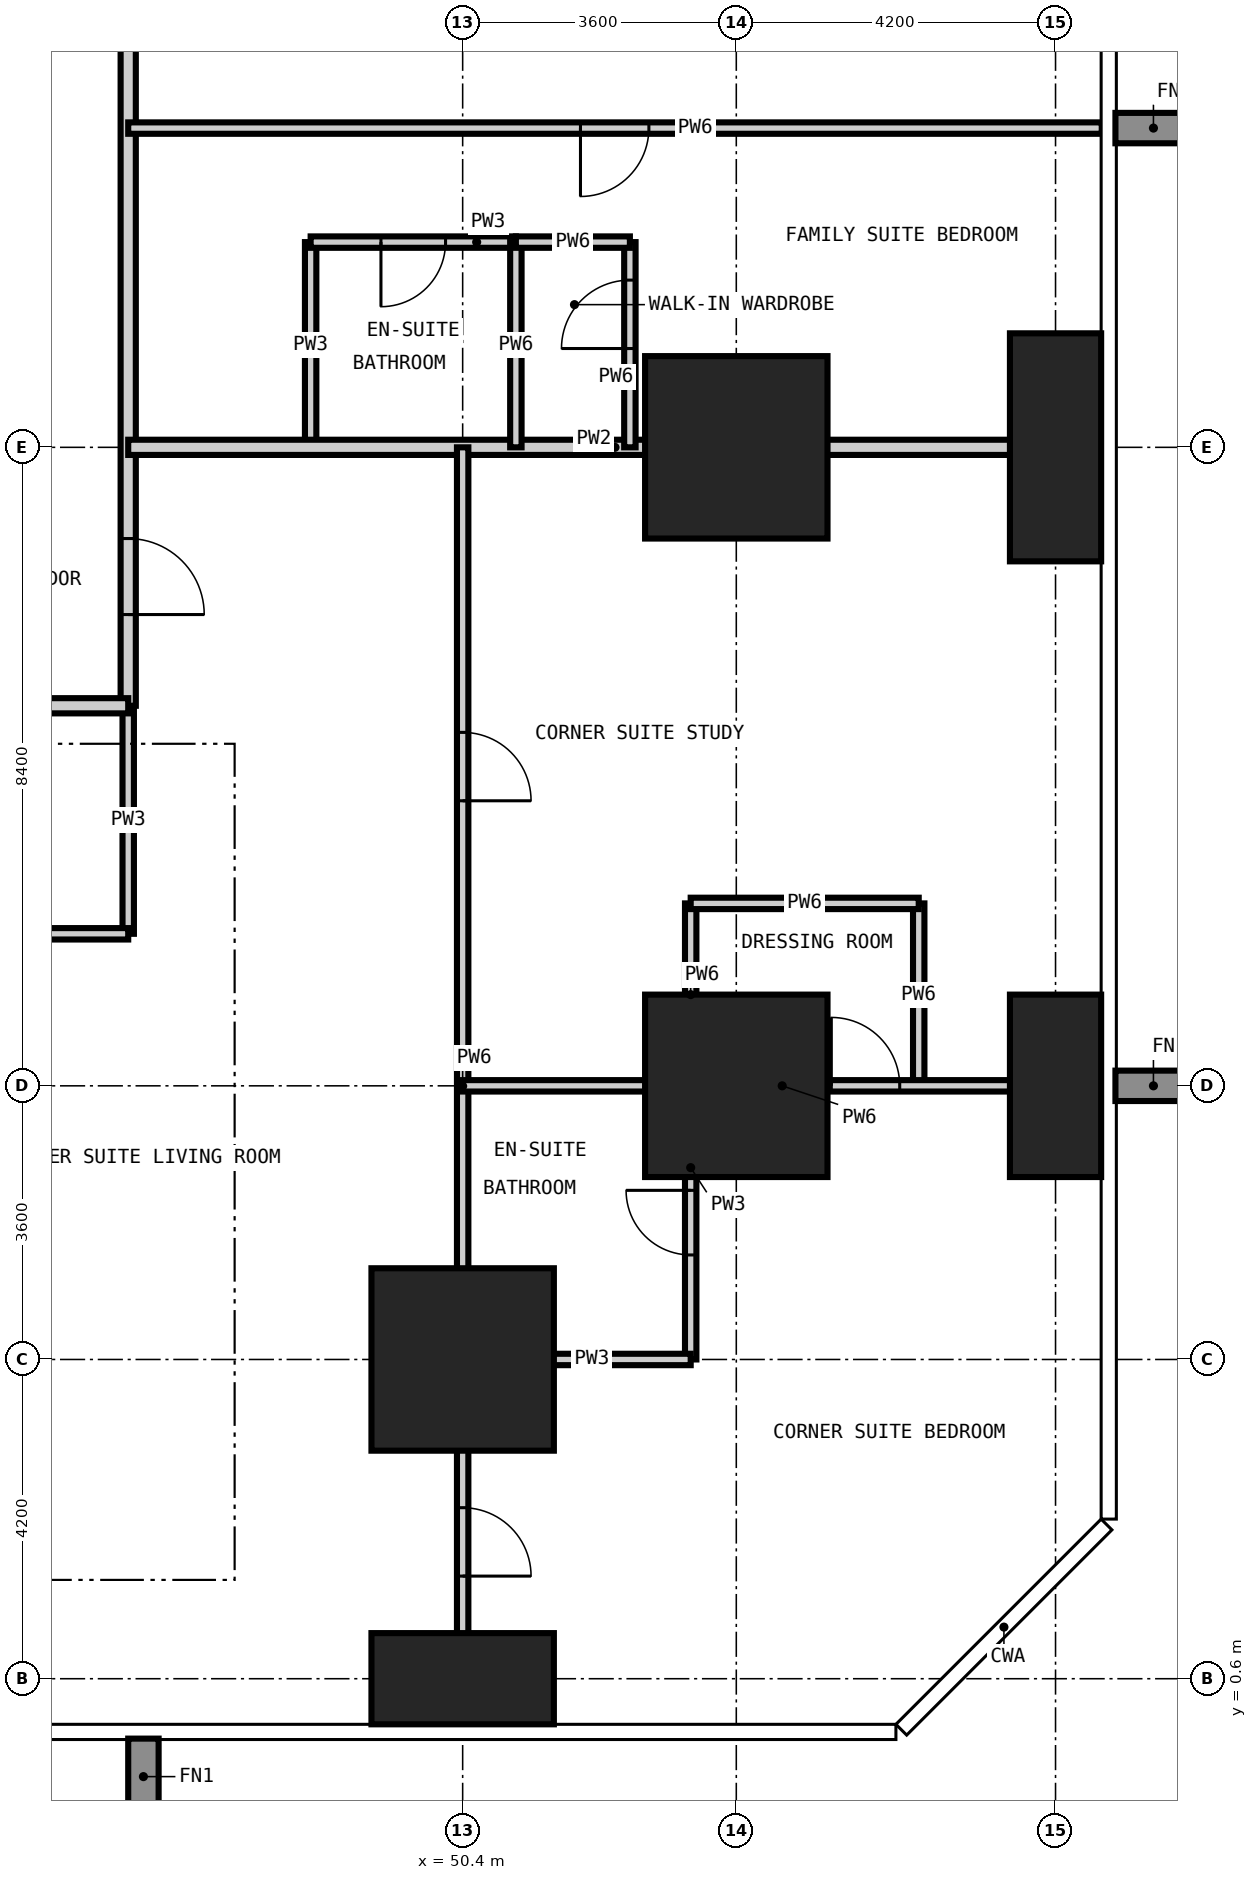
"""IFC4 building model, lengths in metres.
Left out: names, types, materials, properties, quantities, classifications, styles, units other than length and angle.
Written with IfcOpenShell. Run it as: python <this file> out.ifc"""

import sys

from ifc_helpers import new_model, si_unit, direction, frame, frame_2d, origin, origin_2d, place, context, subcontext, project, spatial, rectangle, extrude, element, fill, save


model = new_model("IFC4")
c1 = context("Model", 3, precision=1e-05, world=origin(), true_north=direction((0.0, 1.0)))
c2 = subcontext(c1, "Body", "Model", "MODEL_VIEW")
j1 = project(units=[si_unit("LENGTHUNIT", "METRE"), si_unit("PLANEANGLEUNIT", "RADIAN")], contexts=[c1])
p1 = place(None, origin())
s1 = spatial("IfcSite", under=j1, at=p1, CompositionType="ELEMENT")
p2 = place(p1, origin())
s2 = spatial("IfcBuilding", under=s1, at=p2, CompositionType="ELEMENT")
p3 = place(p2, frame((0.0, 0.0, 84.6)))
s3 = spatial("IfcBuildingStorey", under=s2, at=p3, CompositionType="ELEMENT", Elevation=84.6)
p4 = place(p3, frame((50.4, 0.6, -0.35), z_axis=(0.0, 0.0, 1.0), x_axis=(1.0, 0.0, 0.0)))
e1 = element("IfcColumn", 1, at=p4, inside=s3, PredefinedType="COLUMN", context=c2, shape_type="SweptSolid", body=[
    extrude(rectangle(XDim=2.4, YDim=1.2, at=origin_2d()), origin(), (0.0, 0.0, 1.0), 3.55),
])
for number, where, z_axis, x_axis in (
    (2, (50.4, 4.8, -0.35), (0.0, 0.0, 1.0), (1.0, 0.0, 0.0)),
    (3, (54.0, 8.4, -0.35), (0.0, 0.0, 1.0), (1.0, 0.0, 0.0)),
    (4, (54.0, 16.8, -0.35), (0.0, 0.0, 1.0), (1.0, 0.0, 0.0)),
):
    element("IfcColumn", number, at=place(p3, frame(where, z_axis=z_axis, x_axis=x_axis)), inside=s3, PredefinedType="COLUMN", context=c2, shape_type="SweptSolid", body=[
        extrude(rectangle(XDim=2.4, YDim=2.4, at=origin_2d()), origin(), (0.0, 0.0, 1.0), 3.55),
    ])
p5 = place(p3, frame((58.2, 8.4, -0.35), z_axis=(0.0, 0.0, 1.0), x_axis=(1.0, 0.0, 0.0)))
e5 = element("IfcColumn", 5, at=p5, inside=s3, PredefinedType="COLUMN", context=c2, shape_type="SweptSolid", body=[
    extrude(rectangle(XDim=1.2, YDim=2.4, at=origin_2d()), origin(), (0.0, 0.0, 1.0), 3.55),
])
p6 = place(p3, frame((58.2, 16.8, -0.35), z_axis=(0.0, 0.0, 1.0), x_axis=(1.0, 0.0, 0.0)))
e6 = element("IfcColumn", 6, at=p6, inside=s3, PredefinedType="COLUMN", context=c2, shape_type="SweptSolid", body=[
    extrude(rectangle(XDim=1.2, YDim=3.0, at=origin_2d()), origin(), (0.0, 0.0, 1.0), 3.55),
])
p7 = place(p3, frame((46.0, 10.4, 0.0), z_axis=(0.0, 0.0, 1.0), x_axis=(0.0, 1.0, 0.0)))
e7 = element("IfcWall", 7, at=p7, inside=s3, PredefinedType="PARTITIONING", context=c2, shape_type="SweptSolid", body=[
    extrude(rectangle(XDim=3.0, YDim=0.15, at=frame_2d((1.5, 0.0))), origin(), (0.0, 0.0, 1.0), 3.2),
])
p8 = place(p3, frame((48.4, 16.8, 0.0), z_axis=(0.0, 0.0, 1.0), x_axis=(0.0, 1.0, 0.0)))
e8 = element("IfcWall", 8, at=p8, inside=s3, PredefinedType="PARTITIONING", context=c2, shape_type="SweptSolid", body=[
    extrude(rectangle(XDim=2.7, YDim=0.15, at=frame_2d((1.35, 0.0))), origin(), (0.0, 0.0, 1.0), 3.2),
])
p9 = place(p3, frame((53.4, 4.8, 0.0), z_axis=(0.0, 0.0, 1.0), x_axis=(0.0, 1.0, 0.0)))
e9 = element("IfcWall", 9, at=p9, inside=s3, PredefinedType="PARTITIONING", context=c2, shape_type="SweptSolid", body=[
    extrude(rectangle(XDim=3.6, YDim=0.15, at=frame_2d((1.8, 0.0))), origin(), (0.0, 0.0, 1.0), 3.2),
])
p10 = place(p9, frame((1.375, 0.0, 0.0)))
e10 = element("IfcOpeningElement", 10, at=p10, cuts=e9, PredefinedType="OPENING", context=c2, shape_type="SweptSolid", body=[
    extrude(rectangle(XDim=0.85, YDim=2.1, at=frame_2d((0.425, 1.05))), frame((0.0, 0.085, 0.0), z_axis=(0.0, -1.0, 0.0), x_axis=(1.0, 0.0, 0.0)), (0.0, 0.0, 1.0), 0.17),
])
p11 = place(p3, frame((50.4, 4.8, 0.0), z_axis=(0.0, 0.0, 1.0), x_axis=(1.0, 0.0, 0.0)))
e11 = element("IfcWall", 11, at=p11, inside=s3, PredefinedType="PARTITIONING", context=c2, shape_type="SweptSolid", body=[
    extrude(rectangle(XDim=3.0, YDim=0.15, at=frame_2d((1.5, 0.0))), origin(), (0.0, 0.0, 1.0), 3.2),
])
p12 = place(p3, frame((42.0, 10.4, 0.0), z_axis=(0.0, 0.0, 1.0), x_axis=(1.0, 0.0, 0.0)))
e12 = element("IfcWall", 12, at=p12, inside=s3, PredefinedType="PARTITIONING", context=c2, shape_type="SweptSolid", body=[
    extrude(rectangle(XDim=4.0, YDim=0.15, at=frame_2d((2.0, 0.0))), origin(), (0.0, 0.0, 1.0), 3.2),
])
p13 = place(p12, frame((1.575, 0.0, 0.0)))
e13 = element("IfcOpeningElement", 13, at=p13, cuts=e12, PredefinedType="OPENING", context=c2, shape_type="SweptSolid", body=[
    extrude(rectangle(XDim=0.85, YDim=2.1, at=frame_2d((0.425, 1.05))), frame((0.0, 0.085, 0.0), z_axis=(0.0, -1.0, 0.0), x_axis=(1.0, 0.0, 0.0)), (0.0, 0.0, 1.0), 0.17),
])
p14 = place(p3, frame((48.4, 19.5, 0.0), z_axis=(0.0, 0.0, 1.0), x_axis=(1.0, 0.0, 0.0)))
e14 = element("IfcWall", 14, at=p14, inside=s3, PredefinedType="PARTITIONING", context=c2, shape_type="SweptSolid", body=[
    extrude(rectangle(XDim=2.7, YDim=0.15, at=frame_2d((1.35, 0.0))), origin(), (0.0, 0.0, 1.0), 3.2),
])
p15 = place(p14, frame((0.925, 0.0, 0.0)))
e15 = element("IfcOpeningElement", 15, at=p15, cuts=e14, PredefinedType="OPENING", context=c2, shape_type="SweptSolid", body=[
    extrude(rectangle(XDim=0.85, YDim=2.1, at=frame_2d((0.425, 1.05))), frame((0.0, 0.085, 0.0), z_axis=(0.0, -1.0, 0.0), x_axis=(1.0, 0.0, 0.0)), (0.0, 0.0, 1.0), 0.17),
])
p16 = place(p3, frame((46.0, 44.8, 0.0), z_axis=(0.0, 0.0, 1.0), x_axis=(0.0, -1.0, 0.0)))
e16 = element("IfcWall", 16, at=p16, inside=s3, PredefinedType="PARTITIONING", context=c2, shape_type="SweptSolid", body=[
    extrude(rectangle(XDim=31.4, YDim=0.2, at=frame_2d((15.7, 0.0))), origin(), (0.0, 0.0, 1.0), 3.2),
])
p17 = place(p16, frame((21.2, 0.0, 0.0)))
e17 = element("IfcOpeningElement", 17, at=p17, cuts=e16, PredefinedType="OPENING", context=c2, shape_type="SweptSolid", body=[
    extrude(rectangle(XDim=1.0, YDim=2.2, at=frame_2d((0.5, 1.1))), frame((0.0, 0.11, 0.0), z_axis=(0.0, -1.0, 0.0), x_axis=(1.0, 0.0, 0.0)), (0.0, 0.0, 1.0), 0.22),
])
p18 = place(p16, frame((8.6, 0.0, 0.0)))
e18 = element("IfcOpeningElement", 18, at=p18, cuts=e16, PredefinedType="OPENING", context=c2, shape_type="SweptSolid", body=[
    extrude(rectangle(XDim=1.0, YDim=2.2, at=frame_2d((0.5, 1.1))), frame((0.0, 0.11, 0.0), z_axis=(0.0, -1.0, 0.0), x_axis=(1.0, 0.0, 0.0)), (0.0, 0.0, 1.0), 0.22),
])
p19 = place(p16, frame((29.2, 0.0, 0.0)))
e19 = element("IfcOpeningElement", 19, at=p19, cuts=e16, PredefinedType="OPENING", context=c2, shape_type="SweptSolid", body=[
    extrude(rectangle(XDim=1.0, YDim=2.2, at=frame_2d((0.5, 1.1))), frame((0.0, 0.11, 0.0), z_axis=(0.0, -1.0, 0.0), x_axis=(1.0, 0.0, 0.0)), (0.0, 0.0, 1.0), 0.22),
])
p20 = place(p16, frame((0.9, 0.0, 0.0)))
e20 = element("IfcOpeningElement", 20, at=p20, cuts=e16, PredefinedType="OPENING", context=c2, shape_type="SweptSolid", body=[
    extrude(rectangle(XDim=1.0, YDim=2.2, at=frame_2d((0.5, 1.1))), frame((0.0, 0.11, 0.0), z_axis=(0.0, -1.0, 0.0), x_axis=(1.0, 0.0, 0.0)), (0.0, 0.0, 1.0), 0.22),
])
p21 = place(p3, frame((46.0, 13.4, 0.0), z_axis=(0.0, 0.0, 1.0), x_axis=(-1.0, 0.0, 0.0)))
e21 = element("IfcWall", 21, at=p21, inside=s3, PredefinedType="PARTITIONING", context=c2, shape_type="SweptSolid", body=[
    extrude(rectangle(XDim=32.6, YDim=0.2, at=frame_2d((16.3, 0.0))), origin(), (0.0, 0.0, 1.0), 3.2),
])
p22 = place(p21, frame((26.6, 0.0, 0.0)))
e22 = element("IfcOpeningElement", 22, at=p22, cuts=e21, PredefinedType="OPENING", context=c2, shape_type="SweptSolid", body=[
    extrude(rectangle(XDim=1.0, YDim=2.2, at=frame_2d((0.5, 1.1))), frame((0.0, 0.11, 0.0), z_axis=(0.0, -1.0, 0.0), x_axis=(1.0, 0.0, 0.0)), (0.0, 0.0, 1.0), 0.22),
])
p23 = place(p21, frame((19.1, 0.0, 0.0)))
e23 = element("IfcOpeningElement", 23, at=p23, cuts=e21, PredefinedType="OPENING", context=c2, shape_type="SweptSolid", body=[
    extrude(rectangle(XDim=1.0, YDim=2.2, at=frame_2d((0.5, 1.1))), frame((0.0, 0.11, 0.0), z_axis=(0.0, -1.0, 0.0), x_axis=(1.0, 0.0, 0.0)), (0.0, 0.0, 1.0), 0.22),
])
p24 = place(p21, frame((13.1, 0.0, 0.0)))
e24 = element("IfcOpeningElement", 24, at=p24, cuts=e21, PredefinedType="OPENING", context=c2, shape_type="SweptSolid", body=[
    extrude(rectangle(XDim=1.0, YDim=2.2, at=frame_2d((0.5, 1.1))), frame((0.0, 0.11, 0.0), z_axis=(0.0, -1.0, 0.0), x_axis=(1.0, 0.0, 0.0)), (0.0, 0.0, 1.0), 0.22),
])
p25 = place(p21, frame((5.6, 0.0, 0.0)))
e25 = element("IfcOpeningElement", 25, at=p25, cuts=e21, PredefinedType="OPENING", context=c2, shape_type="SweptSolid", body=[
    extrude(rectangle(XDim=1.0, YDim=2.2, at=frame_2d((0.5, 1.1))), frame((0.0, 0.11, 0.0), z_axis=(0.0, -1.0, 0.0), x_axis=(1.0, 0.0, 0.0)), (0.0, 0.0, 1.0), 0.22),
])
p26 = place(p3, frame((46.0, 16.8, 0.0), z_axis=(0.0, 0.0, 1.0), x_axis=(1.0, 0.0, 0.0)))
e26 = element("IfcWall", 26, at=p26, inside=s3, PredefinedType="PARTITIONING", context=c2, shape_type="SweptSolid", body=[
    extrude(rectangle(XDim=12.808, YDim=0.2, at=frame_2d((6.404, 0.0))), origin(), (0.0, 0.0, 1.0), 3.2),
])
p27 = place(p3, frame((50.4, -0.008, 0.0), z_axis=(0.0, 0.0, 1.0), x_axis=(0.0, 1.0, 0.0)))
e27 = element("IfcWall", 27, at=p27, inside=s3, PredefinedType="PARTITIONING", context=c2, shape_type="SweptSolid", body=[
    extrude(rectangle(XDim=16.808, YDim=0.15, at=frame_2d((8.404, 0.0))), origin(), (0.0, 0.0, 1.0), 3.2),
])
p28 = place(p27, frame((1.958, 0.0, 0.0)))
e28 = element("IfcOpeningElement", 28, at=p28, cuts=e27, PredefinedType="OPENING", context=c2, shape_type="SweptSolid", body=[
    extrude(rectangle(XDim=0.9, YDim=2.1, at=frame_2d((0.45, 1.05))), frame((0.0, 0.085, 0.0), z_axis=(0.0, -1.0, 0.0), x_axis=(1.0, 0.0, 0.0)), (0.0, 0.0, 1.0), 0.17),
])
p29 = place(p27, frame((12.158, 0.0, 0.0)))
e29 = element("IfcOpeningElement", 29, at=p29, cuts=e27, PredefinedType="OPENING", context=c2, shape_type="SweptSolid", body=[
    extrude(rectangle(XDim=0.9, YDim=2.1, at=frame_2d((0.45, 1.05))), frame((0.0, 0.085, 0.0), z_axis=(0.0, -1.0, 0.0), x_axis=(1.0, 0.0, 0.0)), (0.0, 0.0, 1.0), 0.17),
])
p30 = place(p3, frame((51.1, 16.8, 0.0), z_axis=(0.0, 0.0, 1.0), x_axis=(0.0, 1.0, 0.0)))
e30 = element("IfcWall", 30, at=p30, inside=s3, PredefinedType="PARTITIONING", context=c2, shape_type="SweptSolid", body=[
    extrude(rectangle(XDim=2.7, YDim=0.15, at=frame_2d((1.35, 0.0))), origin(), (0.0, 0.0, 1.0), 3.2),
])
p31 = place(p3, frame((52.6, 16.8, 0.0), z_axis=(0.0, 0.0, 1.0), x_axis=(0.0, 1.0, 0.0)))
e31 = element("IfcWall", 31, at=p31, inside=s3, PredefinedType="PARTITIONING", context=c2, shape_type="SweptSolid", body=[
    extrude(rectangle(XDim=2.7, YDim=0.15, at=frame_2d((1.35, 0.0))), origin(), (0.0, 0.0, 1.0), 3.2),
])
p32 = place(p31, frame((1.3, 0.0, 0.0)))
e32 = element("IfcOpeningElement", 32, at=p32, cuts=e31, PredefinedType="OPENING", context=c2, shape_type="SweptSolid", body=[
    extrude(rectangle(XDim=0.9, YDim=2.1, at=frame_2d((0.45, 1.05))), frame((0.0, 0.085, 0.0), z_axis=(0.0, -1.0, 0.0), x_axis=(1.0, 0.0, 0.0)), (0.0, 0.0, 1.0), 0.17),
])
for number, where, z_axis, x_axis in (
    (33, (53.4, 8.4, 0.0), (0.0, 0.0, 1.0), (0.0, 1.0, 0.0)),
    (34, (56.4, 8.4, 0.0), (0.0, 0.0, 1.0), (0.0, 1.0, 0.0)),
):
    element("IfcWall", number, at=place(p3, frame(where, z_axis=z_axis, x_axis=x_axis)), inside=s3, PredefinedType="PARTITIONING", context=c2, shape_type="SweptSolid", body=[
        extrude(rectangle(XDim=2.4, YDim=0.15, at=frame_2d((1.2, 0.0))), origin(), (0.0, 0.0, 1.0), 3.2),
    ])
p33 = place(p3, frame((50.4, 8.4, 0.0), z_axis=(0.0, 0.0, 1.0), x_axis=(1.0, 0.0, 0.0)))
e35 = element("IfcWall", 35, at=p33, inside=s3, PredefinedType="PARTITIONING", context=c2, shape_type="SweptSolid", body=[
    extrude(rectangle(XDim=8.408, YDim=0.15, at=frame_2d((4.204, 0.0))), origin(), (0.0, 0.0, 1.0), 3.2),
])
p34 = place(p33, frame((4.85, 0.0, 0.0)))
e36 = element("IfcOpeningElement", 36, at=p34, cuts=e35, PredefinedType="OPENING", context=c2, shape_type="SweptSolid", body=[
    extrude(rectangle(XDim=0.9, YDim=2.1, at=frame_2d((0.45, 1.05))), frame((0.0, 0.085, 0.0), z_axis=(0.0, -1.0, 0.0), x_axis=(1.0, 0.0, 0.0)), (0.0, 0.0, 1.0), 0.17),
])
p35 = place(p3, frame((53.4, 10.8, 0.0), z_axis=(0.0, 0.0, 1.0), x_axis=(1.0, 0.0, 0.0)))
e37 = element("IfcWall", 37, at=p35, inside=s3, PredefinedType="PARTITIONING", context=c2, shape_type="SweptSolid", body=[
    extrude(rectangle(XDim=3.0, YDim=0.15, at=frame_2d((1.5, 0.0))), origin(), (0.0, 0.0, 1.0), 3.2),
])
p36 = place(p3, frame((51.1, 19.5, 0.0), z_axis=(0.0, 0.0, 1.0), x_axis=(1.0, 0.0, 0.0)))
e38 = element("IfcWall", 38, at=p36, inside=s3, PredefinedType="PARTITIONING", context=c2, shape_type="SweptSolid", body=[
    extrude(rectangle(XDim=1.5, YDim=0.15, at=frame_2d((0.75, 0.0))), origin(), (0.0, 0.0, 1.0), 3.2),
])
p37 = place(p3, frame((46.0, 21.0, 0.0), z_axis=(0.0, 0.0, 1.0), x_axis=(1.0, 0.0, 0.0)))
e39 = element("IfcWall", 39, at=p37, inside=s3, PredefinedType="PARTITIONING", context=c2, shape_type="SweptSolid", body=[
    extrude(rectangle(XDim=12.808, YDim=0.15, at=frame_2d((6.404, 0.0))), origin(), (0.0, 0.0, 1.0), 3.2),
])
p38 = place(p37, frame((5.95, 0.0, 0.0)))
e40 = element("IfcOpeningElement", 40, at=p38, cuts=e39, PredefinedType="OPENING", context=c2, shape_type="SweptSolid", body=[
    extrude(rectangle(XDim=0.9, YDim=2.1, at=frame_2d((0.45, 1.05))), frame((0.0, 0.085, 0.0), z_axis=(0.0, -1.0, 0.0), x_axis=(1.0, 0.0, 0.0)), (0.0, 0.0, 1.0), 0.17),
])
p39 = place(p38, frame((0.9, 0.0, 0.0), z_axis=(0.0, 0.0, 1.0), x_axis=(-1.0, 0.0, 0.0)))
e41 = element("IfcDoor", 41, at=p39, inside=s3, OperationType="SINGLE_SWING_RIGHT", PredefinedType="DOOR", context=c2, shape_type="SweptSolid", body=[
    extrude(rectangle(XDim=0.9, YDim=2.1, at=frame_2d((0.45, 1.05))), frame((0.0, 0.025, 0.0), z_axis=(0.0, -1.0, 0.0), x_axis=(1.0, 0.0, 0.0)), (0.0, 0.0, 1.0), 0.05),
])
fill(e40, e41)
p40 = place(p15, frame((0.85, 0.0, 0.0), z_axis=(0.0, 0.0, 1.0), x_axis=(-1.0, 0.0, 0.0)))
e42 = element("IfcDoor", 42, at=p40, inside=s3, OperationType="SINGLE_SWING_RIGHT", PredefinedType="DOOR", context=c2, shape_type="SweptSolid", body=[
    extrude(rectangle(XDim=0.85, YDim=2.1, at=frame_2d((0.425, 1.05))), frame((0.0, 0.025, 0.0), z_axis=(0.0, -1.0, 0.0), x_axis=(1.0, 0.0, 0.0)), (0.0, 0.0, 1.0), 0.05),
])
fill(e15, e42)
p41 = place(p32, origin())
e43 = element("IfcDoor", 43, at=p41, inside=s3, OperationType="SINGLE_SWING_LEFT", PredefinedType="DOOR", context=c2, shape_type="SweptSolid", body=[
    extrude(rectangle(XDim=0.9, YDim=2.1, at=frame_2d((0.45, 1.05))), frame((0.0, 0.025, 0.0), z_axis=(0.0, -1.0, 0.0), x_axis=(1.0, 0.0, 0.0)), (0.0, 0.0, 1.0), 0.05),
])
fill(e32, e43)
p42 = place(p19, origin())
e44 = element("IfcDoor", 44, at=p42, inside=s3, OperationType="SINGLE_SWING_RIGHT", PredefinedType="DOOR", context=c2, shape_type="SweptSolid", body=[
    extrude(rectangle(XDim=1.0, YDim=2.2, at=frame_2d((0.5, 1.1))), frame((0.0, 0.025, 0.0), z_axis=(0.0, -1.0, 0.0), x_axis=(1.0, 0.0, 0.0)), (0.0, 0.0, 1.0), 0.05),
])
fill(e19, e44)
p43 = place(p28, frame((0.9, 0.0, 0.0), z_axis=(0.0, 0.0, 1.0), x_axis=(-1.0, 0.0, 0.0)))
e45 = element("IfcDoor", 45, at=p43, inside=s3, OperationType="SINGLE_SWING_RIGHT", PredefinedType="DOOR", context=c2, shape_type="SweptSolid", body=[
    extrude(rectangle(XDim=0.9, YDim=2.1, at=frame_2d((0.45, 1.05))), frame((0.0, 0.025, 0.0), z_axis=(0.0, -1.0, 0.0), x_axis=(1.0, 0.0, 0.0)), (0.0, 0.0, 1.0), 0.05),
])
fill(e28, e45)
p44 = place(p10, origin())
e46 = element("IfcDoor", 46, at=p44, inside=s3, OperationType="SINGLE_SWING_RIGHT", PredefinedType="DOOR", context=c2, shape_type="SweptSolid", body=[
    extrude(rectangle(XDim=0.85, YDim=2.1, at=frame_2d((0.425, 1.05))), frame((0.0, 0.025, 0.0), z_axis=(0.0, -1.0, 0.0), x_axis=(1.0, 0.0, 0.0)), (0.0, 0.0, 1.0), 0.05),
])
fill(e10, e46)
p45 = place(p34, origin())
e47 = element("IfcDoor", 47, at=p45, inside=s3, OperationType="SINGLE_SWING_LEFT", PredefinedType="DOOR", context=c2, shape_type="SweptSolid", body=[
    extrude(rectangle(XDim=0.9, YDim=2.1, at=frame_2d((0.45, 1.05))), frame((0.0, 0.025, 0.0), z_axis=(0.0, -1.0, 0.0), x_axis=(1.0, 0.0, 0.0)), (0.0, 0.0, 1.0), 0.05),
])
fill(e36, e47)
p46 = place(p29, frame((0.9, 0.0, 0.0), z_axis=(0.0, 0.0, 1.0), x_axis=(-1.0, 0.0, 0.0)))
e48 = element("IfcDoor", 48, at=p46, inside=s3, OperationType="SINGLE_SWING_RIGHT", PredefinedType="DOOR", context=c2, shape_type="SweptSolid", body=[
    extrude(rectangle(XDim=0.9, YDim=2.1, at=frame_2d((0.45, 1.05))), frame((0.0, 0.025, 0.0), z_axis=(0.0, -1.0, 0.0), x_axis=(1.0, 0.0, 0.0)), (0.0, 0.0, 1.0), 0.05),
])
fill(e29, e48)
save(model, sys.argv[1])
